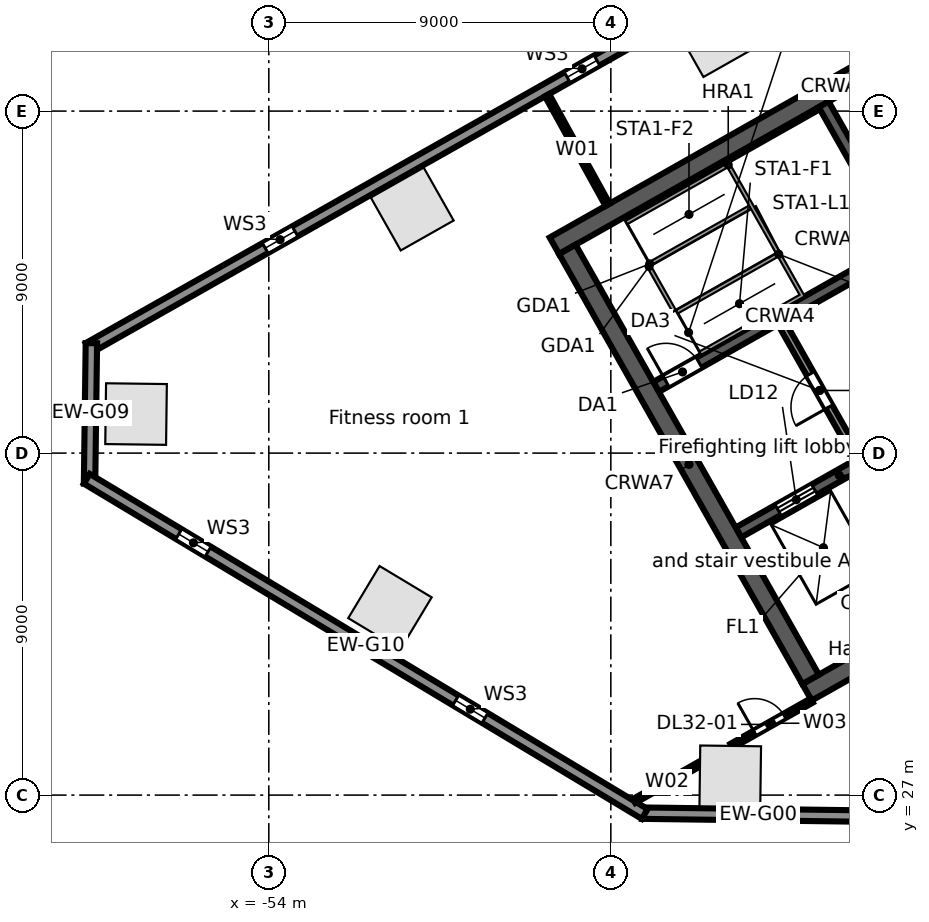
"""IFC4 building model, lengths in metres.
Left out: names, types, materials, properties, quantities, classifications, styles, units other than length and angle.
Written with IfcOpenShell. Run it as: python <this file> out.ifc"""

import sys

from ifc_helpers import new_model, si_unit, direction, frame, frame_2d, origin, origin_2d, place, context, subcontext, project, spatial, rectangle, extrude, element, fill, save


model = new_model("IFC4")
c1 = context("Model", 3, precision=1e-05, world=origin(), true_north=direction((0.0, 1.0)))
c2 = subcontext(c1, "Body", "Model", "MODEL_VIEW")
j1 = project(units=[si_unit("LENGTHUNIT", "METRE"), si_unit("PLANEANGLEUNIT", "RADIAN")], contexts=[c1])
p1 = place(None, origin())
s1 = spatial("IfcSite", under=j1, at=p1, CompositionType="ELEMENT")
p2 = place(p1, origin())
s2 = spatial("IfcBuilding", under=s1, at=p2, CompositionType="ELEMENT")
p3 = place(p2, frame((0.0, 0.0, 158.9)))
s3 = spatial("IfcBuildingStorey", under=s2, at=p3, CompositionType="ELEMENT", Elevation=158.9)
p4 = place(p3, frame((-42.28, 46.919, 0.0), z_axis=(0.0, 0.0, 1.0), x_axis=(-0.87035569594, -0.492423560103, 0.0)))
e1 = element("IfcColumn", 1, at=p4, inside=s3, PredefinedType="COLUMN", context=c2, shape_type="SweptSolid", body=[
    extrude(rectangle(XDim=1.5, YDim=1.5, at=origin_2d()), origin(), (0.0, 0.0, 1.0), 4.0),
])
for number, where, z_axis, x_axis in (
    (2, (-50.226, 42.423, 0.0), (0.0, 0.0, 1.0), (-0.87, -0.492, 0.0)),
    (3, (-57.493, 37.027, 0.0), (0.0, 0.0, 1.0), (-0.013, -1.0, 0.0)),
    (4, (-50.812, 31.931, 0.0), (0.0, 0.0, 1.0), (0.857, -0.515, 0.0)),
    (5, (-41.858, 27.495, 0.0), (0.0, 0.0, 1.0), (1.0, -0.013, 0.0)),
):
    element("IfcColumn", number, at=place(p3, frame(where, z_axis=z_axis, x_axis=x_axis)), inside=s3, PredefinedType="COLUMN", context=c2, shape_type="SweptSolid", body=[
        extrude(rectangle(XDim=1.6, YDim=1.6, at=origin_2d()), origin(), (0.0, 0.0, 1.0), 4.0),
    ])
p5 = place(p3, frame((-38.057, 26.445, 0.0), z_axis=(0.0, 0.0, 1.0), x_axis=(-0.999914086342, 0.013108010296, 0.0)))
e6 = element("IfcWall", 6, at=p5, inside=s3, PredefinedType="STANDARD", context=c2, shape_type="SweptSolid", body=[
    extrude(rectangle(XDim=6.128, YDim=0.3, at=frame_2d((3.064, 0.0))), origin(), (0.0, 0.0, 1.0), 3.68),
])
p6 = place(p3, frame((-58.745, 38.764, 0.0), z_axis=(0.0, 0.0, 1.0), x_axis=(0.870355811726, 0.492423355453, 0.0)))
e7 = element("IfcWall", 7, at=p6, inside=s3, PredefinedType="STANDARD", context=c2, shape_type="SweptSolid", body=[
    extrude(rectangle(XDim=64.025, YDim=0.3, at=frame_2d((32.013, 0.0))), origin(), (0.0, 0.0, 1.0), 3.68),
])
p7 = place(p6, frame((60.122, 0.0, 0.6)))
e8 = element("IfcOpeningElement", 8, at=p7, cuts=e7, PredefinedType="OPENING", context=c2, shape_type="SweptSolid", body=[
    extrude(rectangle(XDim=0.9, YDim=2.4, at=frame_2d((0.45, 1.2))), frame((0.0, 0.16, 0.0), z_axis=(0.0, -1.0, 0.0), x_axis=(1.0, 0.0, 0.0)), (0.0, 0.0, 1.0), 0.32),
])
p8 = place(p6, frame((50.992, 0.0, 0.6)))
e9 = element("IfcOpeningElement", 9, at=p8, cuts=e7, PredefinedType="OPENING", context=c2, shape_type="SweptSolid", body=[
    extrude(rectangle(XDim=0.9, YDim=2.4, at=frame_2d((0.45, 1.2))), frame((0.0, 0.16, 0.0), z_axis=(0.0, -1.0, 0.0), x_axis=(1.0, 0.0, 0.0)), (0.0, 0.0, 1.0), 0.32),
])
p9 = place(p6, frame((41.862, 0.0, 0.6)))
e10 = element("IfcOpeningElement", 10, at=p9, cuts=e7, PredefinedType="OPENING", context=c2, shape_type="SweptSolid", body=[
    extrude(rectangle(XDim=0.9, YDim=2.4, at=frame_2d((0.45, 1.2))), frame((0.0, 0.16, 0.0), z_axis=(0.0, -1.0, 0.0), x_axis=(1.0, 0.0, 0.0)), (0.0, 0.0, 1.0), 0.32),
])
p10 = place(p6, frame((32.732, 0.0, 0.6)))
e11 = element("IfcOpeningElement", 11, at=p10, cuts=e7, PredefinedType="OPENING", context=c2, shape_type="SweptSolid", body=[
    extrude(rectangle(XDim=0.9, YDim=2.4, at=frame_2d((0.45, 1.2))), frame((0.0, 0.16, 0.0), z_axis=(0.0, -1.0, 0.0), x_axis=(1.0, 0.0, 0.0)), (0.0, 0.0, 1.0), 0.32),
])
p11 = place(p6, frame((23.602, 0.0, 0.6)))
e12 = element("IfcOpeningElement", 12, at=p11, cuts=e7, PredefinedType="OPENING", context=c2, shape_type="SweptSolid", body=[
    extrude(rectangle(XDim=0.9, YDim=2.4, at=frame_2d((0.45, 1.2))), frame((0.0, 0.16, 0.0), z_axis=(0.0, -1.0, 0.0), x_axis=(1.0, 0.0, 0.0)), (0.0, 0.0, 1.0), 0.32),
])
p12 = place(p6, frame((14.472, 0.0, 0.6)))
e13 = element("IfcOpeningElement", 13, at=p12, cuts=e7, PredefinedType="OPENING", context=c2, shape_type="SweptSolid", body=[
    extrude(rectangle(XDim=0.9, YDim=2.4, at=frame_2d((0.45, 1.2))), frame((0.0, 0.16, 0.0), z_axis=(0.0, -1.0, 0.0), x_axis=(1.0, 0.0, 0.0)), (0.0, 0.0, 1.0), 0.32),
])
p13 = place(p6, frame((5.342, 0.0, 0.6)))
e14 = element("IfcOpeningElement", 14, at=p13, cuts=e7, PredefinedType="OPENING", context=c2, shape_type="SweptSolid", body=[
    extrude(rectangle(XDim=0.9, YDim=2.4, at=frame_2d((0.45, 1.2))), frame((0.0, 0.16, 0.0), z_axis=(0.0, -1.0, 0.0), x_axis=(1.0, 0.0, 0.0)), (0.0, 0.0, 1.0), 0.32),
])
p14 = place(p3, frame((-58.717, 35.194, 0.0), z_axis=(0.0, 0.0, 1.0), x_axis=(0.013069053407, 0.999914596275, 0.0)))
e15 = element("IfcWall", 15, at=p14, inside=s3, PredefinedType="STANDARD", context=c2, shape_type="SweptSolid", body=[
    extrude(rectangle(XDim=3.699, YDim=0.3, at=frame_2d((1.849, 0.0))), origin(), (0.0, 0.0, 1.0), 3.68),
])
p15 = place(p3, frame((-44.109, 26.504, 0.0), z_axis=(0.0, 0.0, 1.0), x_axis=(-0.857169502585, 0.515034410344, 0.0)))
e16 = element("IfcWall", 16, at=p15, inside=s3, PredefinedType="STANDARD", context=c2, shape_type="SweptSolid", body=[
    extrude(rectangle(XDim=17.127, YDim=0.3, at=frame_2d((8.563, 0.0))), origin(), (0.0, 0.0, 1.0), 3.68),
])
p16 = place(p15, frame((13.403, 0.0, 0.6)))
e17 = element("IfcOpeningElement", 17, at=p16, cuts=e16, PredefinedType="OPENING", context=c2, shape_type="SweptSolid", body=[
    extrude(rectangle(XDim=0.9, YDim=2.4, at=frame_2d((0.45, 1.2))), frame((0.0, 0.16, 0.0), z_axis=(0.0, -1.0, 0.0), x_axis=(1.0, 0.0, 0.0)), (0.0, 0.0, 1.0), 0.32),
])
p17 = place(p15, frame((4.903, 0.0, 0.6)))
e18 = element("IfcOpeningElement", 18, at=p17, cuts=e16, PredefinedType="OPENING", context=c2, shape_type="SweptSolid", body=[
    extrude(rectangle(XDim=0.9, YDim=2.4, at=frame_2d((0.45, 1.2))), frame((0.0, 0.16, 0.0), z_axis=(0.0, -1.0, 0.0), x_axis=(1.0, 0.0, 0.0)), (0.0, 0.0, 1.0), 0.32),
])
p18 = place(p3, frame((-39.838, 29.705, 0.0), z_axis=(0.0, 0.0, 1.0), x_axis=(0.870350116061, 0.492433422375, 0.0)))
e19 = element("IfcWall", 19, at=p18, inside=s3, PredefinedType="SOLIDWALL", context=c2, shape_type="SweptSolid", body=[
    extrude(rectangle(XDim=17.0, YDim=0.5, at=frame_2d((8.5, 0.0))), origin(), (0.0, 0.0, 1.0), 3.68),
])
p19 = place(p18, frame((7.2, 0.0, 0.0)))
e20 = element("IfcOpeningElement", 20, at=p19, cuts=e19, PredefinedType="OPENING", context=c2, shape_type="SweptSolid", body=[
    extrude(rectangle(XDim=1.2, YDim=2.1, at=frame_2d((0.6, 1.05))), frame((0.0, 0.26, 0.0), z_axis=(0.0, -1.0, 0.0), x_axis=(1.0, 0.0, 0.0)), (0.0, 0.0, 1.0), 0.52),
])
p20 = place(p3, frame((-41.643, 33.912, 0.0), z_axis=(0.0, 0.0, 1.0), x_axis=(0.870343599782, 0.492444939378, 0.0)))
e21 = element("IfcWall", 21, at=p20, inside=s3, PredefinedType="SOLIDWALL", context=c2, shape_type="SweptSolid", body=[
    extrude(rectangle(XDim=6.1, YDim=0.3, at=frame_2d((3.05, 0.0))), origin(), (0.0, 0.0, 1.0), 3.68),
])
p21 = place(p20, frame((1.2, 0.0, 0.0)))
e22 = element("IfcOpeningElement", 22, at=p21, cuts=e21, PredefinedType="OPENING", context=c2, shape_type="SweptSolid", body=[
    extrude(rectangle(XDim=1.1, YDim=2.1, at=frame_2d((0.55, 1.05))), frame((0.0, 0.16, 0.0), z_axis=(0.0, -1.0, 0.0), x_axis=(1.0, 0.0, 0.0)), (0.0, 0.0, 1.0), 0.32),
])
p22 = place(p20, frame((4.35, 0.0, 0.0)))
e23 = element("IfcOpeningElement", 23, at=p22, cuts=e21, PredefinedType="OPENING", context=c2, shape_type="SweptSolid", body=[
    extrude(rectangle(XDim=1.1, YDim=2.1, at=frame_2d((0.55, 1.05))), frame((0.0, 0.16, 0.0), z_axis=(0.0, -1.0, 0.0), x_axis=(1.0, 0.0, 0.0)), (0.0, 0.0, 1.0), 0.32),
])
p23 = place(p3, frame((-43.81, 37.741, 0.0), z_axis=(0.0, 0.0, 1.0), x_axis=(0.870350569555, 0.492432620848, 0.0)))
e24 = element("IfcWall", 24, at=p23, inside=s3, PredefinedType="SOLIDWALL", context=c2, shape_type="SweptSolid", body=[
    extrude(rectangle(XDim=7.5, YDim=0.3, at=frame_2d((3.75, 0.0))), origin(), (0.0, 0.0, 1.0), 3.68),
])
p24 = place(p23, frame((0.3, 0.0, 0.0)))
e25 = element("IfcOpeningElement", 25, at=p24, cuts=e24, PredefinedType="OPENING", context=c2, shape_type="SweptSolid", body=[
    extrude(rectangle(XDim=1.0, YDim=2.1, at=frame_2d((0.5, 1.05))), frame((0.0, 0.16, 0.0), z_axis=(0.0, -1.0, 0.0), x_axis=(1.0, 0.0, 0.0)), (0.0, 0.0, 1.0), 0.32),
])
p25 = place(p3, frame((-46.486, 41.455, 0.0), z_axis=(0.0, 0.0, 1.0), x_axis=(0.870353598469, 0.492427267353, 0.0)))
e26 = element("IfcWall", 26, at=p25, inside=s3, PredefinedType="SOLIDWALL", context=c2, shape_type="SweptSolid", body=[
    extrude(rectangle(XDim=17.0, YDim=0.5, at=frame_2d((8.5, 0.0))), origin(), (0.0, 0.0, 1.0), 3.68),
])
p26 = place(p3, frame((-46.145, 41.361, 0.0), z_axis=(0.0, 0.0, 1.0), x_axis=(0.492435316254, -0.870349044525, 0.0)))
e27 = element("IfcWall", 27, at=p26, inside=s3, PredefinedType="SOLIDWALL", context=c2, shape_type="SweptSolid", body=[
    extrude(rectangle(XDim=13.0, YDim=0.5, at=frame_2d((6.5, 0.0))), origin(), (0.0, 0.0, 1.0), 3.68),
])
p27 = place(p3, frame((-40.516, 39.433, 0.0), z_axis=(0.0, 0.0, 1.0), x_axis=(0.492453559952, -0.87033872216, 0.0)))
e28 = element("IfcWall", 28, at=p27, inside=s3, PredefinedType="PARTITIONING", context=c2, shape_type="SweptSolid", body=[
    extrude(rectangle(XDim=4.1, YDim=0.2, at=frame_2d((2.05, 0.0))), origin(), (0.0, 0.0, 1.0), 3.68),
])
p28 = place(p27, frame((1.55, 0.0, 0.0)))
e29 = element("IfcOpeningElement", 29, at=p28, cuts=e28, PredefinedType="OPENING", context=c2, shape_type="SweptSolid", body=[
    extrude(rectangle(XDim=1.0, YDim=2.1, at=frame_2d((0.5, 1.05))), frame((0.0, 0.11, 0.0), z_axis=(0.0, -1.0, 0.0), x_axis=(1.0, 0.0, 0.0)), (0.0, 0.0, 1.0), 0.22),
])
p29 = place(p3, frame((-39.399, 45.177, 0.0), z_axis=(0.0, 0.0, 1.0), x_axis=(0.492396453737, -0.870371031427, 0.0)))
e30 = element("IfcWall", 30, at=p29, inside=s3, PredefinedType="SOLIDWALL", context=c2, shape_type="SweptSolid", body=[
    extrude(rectangle(XDim=4.15, YDim=0.3, at=frame_2d((2.075, 0.0))), origin(), (0.0, 0.0, 1.0), 3.68),
])
p30 = place(p3, frame((-46.678, 45.419, 0.0), z_axis=(0.0, 0.0, 1.0), x_axis=(0.483275206546, -0.875468488718, 0.0)))
e31 = element("IfcWall", 31, at=p30, inside=s3, PredefinedType="PARTITIONING", context=c2, shape_type="SweptSolid", body=[
    extrude(rectangle(XDim=3.294, YDim=0.125, at=frame_2d((1.647, 0.0))), origin(), (0.0, 0.0, 1.0), 2.96),
])
p31 = place(p3, frame((-44.386, 26.845, 0.0), z_axis=(0.0, 0.0, 1.0), x_axis=(0.870453184796, 0.492251209322, 0.0)))
e32 = element("IfcWall", 32, at=p31, inside=s3, PredefinedType="PARTITIONING", context=c2, shape_type="SweptSolid", body=[
    extrude(rectangle(XDim=1.991, YDim=0.125, at=frame_2d((0.995, 0.0))), origin(), (0.0, 0.0, 1.0), 3.68),
])
p32 = place(p3, frame((-41.824, 28.294, 0.0), z_axis=(0.0, 0.0, 1.0), x_axis=(0.870189216305, 0.492717695873, 0.0)))
e33 = element("IfcWall", 33, at=p32, inside=s3, PredefinedType="PARTITIONING", context=c2, shape_type="SweptSolid", body=[
    extrude(rectangle(XDim=2.424, YDim=0.125, at=frame_2d((1.212, 0.0))), origin(), (0.0, 0.0, 1.0), 3.68),
])
p33 = place(p32, frame((0.7, 0.0, 0.0)))
e34 = element("IfcOpeningElement", 34, at=p33, cuts=e33, PredefinedType="OPENING", context=c2, shape_type="SweptSolid", body=[
    extrude(rectangle(XDim=0.9, YDim=2.1, at=frame_2d((0.45, 1.05))), frame((0.0, 0.073, 0.0), z_axis=(0.0, -1.0, 0.0), x_axis=(1.0, 0.0, 0.0)), (0.0, 0.0, 1.0), 0.145),
])
p34 = place(p12, origin())
e35 = element("IfcWindow", 35, at=p34, inside=s3, PartitioningType="SINGLE_PANEL", PredefinedType="WINDOW", context=c2, shape_type="SweptSolid", body=[
    extrude(rectangle(XDim=0.9, YDim=2.4, at=frame_2d((0.45, 1.2))), frame((0.0, 0.03, 0.0), z_axis=(0.0, -1.0, 0.0), x_axis=(1.0, 0.0, 0.0)), (0.0, 0.0, 1.0), 0.06),
])
fill(e13, e35)
p35 = place(p13, origin())
e36 = element("IfcWindow", 36, at=p35, inside=s3, PartitioningType="SINGLE_PANEL", PredefinedType="WINDOW", context=c2, shape_type="SweptSolid", body=[
    extrude(rectangle(XDim=0.9, YDim=2.4, at=frame_2d((0.45, 1.2))), frame((0.0, 0.03, 0.0), z_axis=(0.0, -1.0, 0.0), x_axis=(1.0, 0.0, 0.0)), (0.0, 0.0, 1.0), 0.06),
])
fill(e14, e36)
p36 = place(p16, origin())
e37 = element("IfcWindow", 37, at=p36, inside=s3, PartitioningType="SINGLE_PANEL", PredefinedType="WINDOW", context=c2, shape_type="SweptSolid", body=[
    extrude(rectangle(XDim=0.9, YDim=2.4, at=frame_2d((0.45, 1.2))), frame((0.0, 0.03, 0.0), z_axis=(0.0, -1.0, 0.0), x_axis=(1.0, 0.0, 0.0)), (0.0, 0.0, 1.0), 0.06),
])
fill(e17, e37)
p37 = place(p17, origin())
e38 = element("IfcWindow", 38, at=p37, inside=s3, PartitioningType="SINGLE_PANEL", PredefinedType="WINDOW", context=c2, shape_type="SweptSolid", body=[
    extrude(rectangle(XDim=0.9, YDim=2.4, at=frame_2d((0.45, 1.2))), frame((0.0, 0.03, 0.0), z_axis=(0.0, -1.0, 0.0), x_axis=(1.0, 0.0, 0.0)), (0.0, 0.0, 1.0), 0.06),
])
fill(e18, e38)
p38 = place(p21, origin())
e39 = element("IfcDoor", 39, at=p38, inside=s3, OperationType="DOUBLE_DOOR_SLIDING", PredefinedType="DOOR", context=c2, shape_type="SweptSolid", body=[
    extrude(rectangle(XDim=1.1, YDim=2.1, at=frame_2d((0.55, 1.05))), frame((0.0, 0.025, 0.0), z_axis=(0.0, -1.0, 0.0), x_axis=(1.0, 0.0, 0.0)), (0.0, 0.0, 1.0), 0.05),
])
fill(e22, e39)
p39 = place(p24, origin())
e40 = element("IfcDoor", 40, at=p39, inside=s3, OperationType="SINGLE_SWING_LEFT", PredefinedType="DOOR", context=c2, shape_type="SweptSolid", body=[
    extrude(rectangle(XDim=1.0, YDim=2.1, at=frame_2d((0.5, 1.05))), frame((0.0, 0.025, 0.0), z_axis=(0.0, -1.0, 0.0), x_axis=(1.0, 0.0, 0.0)), (0.0, 0.0, 1.0), 0.05),
])
fill(e25, e40)
p40 = place(p28, frame((1.0, 0.0, 0.0), z_axis=(0.0, 0.0, 1.0), x_axis=(-1.0, 0.0, 0.0)))
e41 = element("IfcDoor", 41, at=p40, inside=s3, OperationType="SINGLE_SWING_LEFT", PredefinedType="DOOR", context=c2, shape_type="SweptSolid", body=[
    extrude(rectangle(XDim=1.0, YDim=2.1, at=frame_2d((0.5, 1.05))), frame((0.0, 0.025, 0.0), z_axis=(0.0, -1.0, 0.0), x_axis=(1.0, 0.0, 0.0)), (0.0, 0.0, 1.0), 0.05),
])
fill(e29, e41)
p41 = place(p33, origin())
e42 = element("IfcDoor", 42, at=p41, inside=s3, OperationType="SINGLE_SWING_LEFT", PredefinedType="DOOR", context=c2, shape_type="SweptSolid", body=[
    extrude(rectangle(XDim=0.9, YDim=2.1, at=frame_2d((0.45, 1.05))), frame((0.0, 0.025, 0.0), z_axis=(0.0, -1.0, 0.0), x_axis=(1.0, 0.0, 0.0)), (0.0, 0.0, 1.0), 0.05),
])
fill(e34, e42)
save(model, sys.argv[1])
